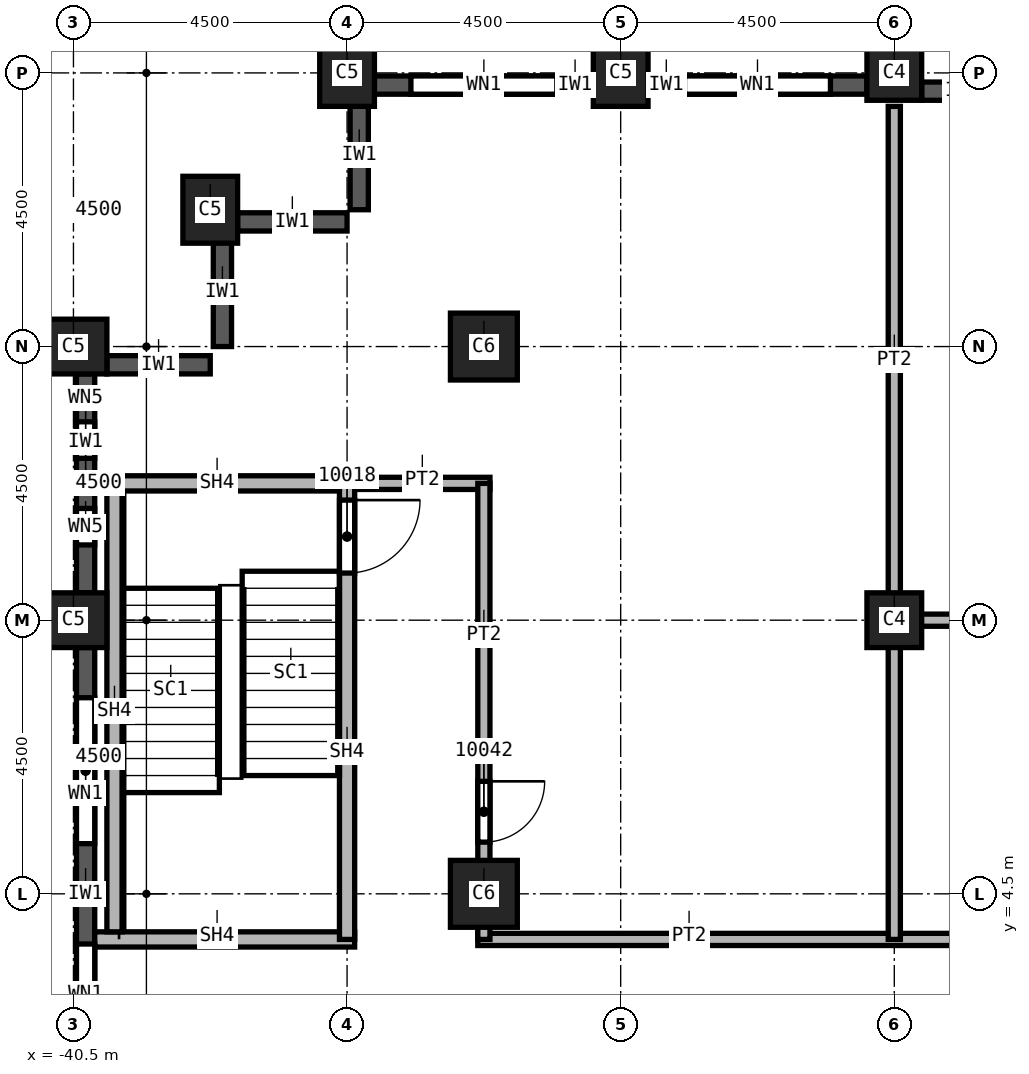
"""IFC4 building model, lengths in metres.
Left out: names, types, materials, properties, quantities, classifications, styles, units other than length and angle.
Written with IfcOpenShell. Run it as: python <this file> out.ifc"""

import sys

from ifc_helpers import new_model, si_unit, direction, frame, frame_2d, origin, origin_2d, place, context, subcontext, project, spatial, rectangle, extrude, element, fill, save


model = new_model("IFC4")
c1 = context("Model", 3, precision=1e-05, world=origin(), true_north=direction((0.0, 1.0)))
c2 = subcontext(c1, "Body", "Model", "MODEL_VIEW")
j1 = project(units=[si_unit("LENGTHUNIT", "METRE"), si_unit("PLANEANGLEUNIT", "RADIAN")], contexts=[c1])
p1 = place(None, origin())
s1 = spatial("IfcSite", under=j1, at=p1, CompositionType="ELEMENT")
p2 = place(p1, origin())
s2 = spatial("IfcBuilding", under=s1, at=p2, CompositionType="ELEMENT")
p3 = place(p2, frame((0.0, 0.0, 174.0)))
s3 = spatial("IfcBuildingStorey", under=s2, at=p3, CompositionType="ELEMENT", Elevation=174.0)
for number, where, z_axis, x_axis in (
    (1, (-40.5, 9.0, 0.0), (0.0, 0.0, 1.0), (0.0, 1.0, 0.0)),
    (2, (-40.5, 13.5, 0.0), (0.0, 0.0, 1.0), (0.0, 1.0, 0.0)),
    (3, (-38.25, 15.75, 0.0), (0.0, 0.0, 1.0), (1.0, 0.0, 0.0)),
    (4, (-31.5, 18.0, 0.0), (0.0, 0.0, 1.0), (1.0, 0.0, 0.0)),
    (5, (-36.0, 18.0, 0.0), (0.0, 0.0, 1.0), (1.0, 0.0, 0.0)),
):
    element("IfcColumn", number, at=place(p3, frame(where, z_axis=z_axis, x_axis=x_axis)), inside=s3, PredefinedType="COLUMN", context=c2, shape_type="SweptSolid", body=[
        extrude(rectangle(XDim=0.9, YDim=1.1, at=origin_2d()), origin(), (0.0, 0.0, 1.0), 3.59),
    ])
for number, where, z_axis, x_axis in (
    (6, (-33.75, 4.5, 0.0), (0.0, 0.0, 1.0), (1.0, 0.0, 0.0)),
    (7, (-33.75, 13.5, 0.0), (0.0, 0.0, 1.0), (1.0, 0.0, 0.0)),
):
    element("IfcColumn", number, at=place(p3, frame(where, z_axis=z_axis, x_axis=x_axis)), inside=s3, PredefinedType="COLUMN", context=c2, shape_type="SweptSolid", body=[
        extrude(rectangle(XDim=1.1, YDim=1.1, at=origin_2d()), origin(), (0.0, 0.0, 1.0), 3.59),
    ])
for number, where, z_axis, x_axis in (
    (8, (-27.0, 9.0, 0.0), (0.0, 0.0, 1.0), (1.0, 0.0, 0.0)),
    (9, (-27.0, 18.0, 0.0), (0.0, 0.0, 1.0), (1.0, 0.0, 0.0)),
):
    element("IfcColumn", number, at=place(p3, frame(where, z_axis=z_axis, x_axis=x_axis)), inside=s3, PredefinedType="COLUMN", context=c2, shape_type="SweptSolid", body=[
        extrude(rectangle(XDim=0.9, YDim=0.9, at=origin_2d()), origin(), (0.0, 0.0, 1.0), 3.59),
    ])
for number, where, z_axis, x_axis in (
    (10, (-35.8, 17.55, 0.0), (0.0, 0.0, 1.0), (0.0, -1.0, 0.0)),
    (11, (-37.8, 15.55, 0.0), (0.0, 0.0, 1.0), (1.0, 0.0, 0.0)),
    (12, (-38.05, 15.3, 0.0), (0.0, 0.0, 1.0), (0.0, -1.0, 0.0)),
):
    element("IfcWall", number, at=place(p3, frame(where, z_axis=z_axis, x_axis=x_axis)), inside=s3, PredefinedType="SOLIDWALL", context=c2, shape_type="SweptSolid", body=[
        extrude(rectangle(XDim=1.8, YDim=0.3, at=frame_2d((0.9, 0.0))), origin(), (0.0, 0.0, 1.0), 2.99),
    ])
p4 = place(p3, frame((-39.95, 13.2, 0.0), z_axis=(0.0, 0.0, 1.0), x_axis=(1.0, 0.0, 0.0)))
e13 = element("IfcWall", 13, at=p4, inside=s3, PredefinedType="SOLIDWALL", context=c2, shape_type="SweptSolid", body=[
    extrude(rectangle(XDim=1.7, YDim=0.3, at=frame_2d((0.85, 0.0))), origin(), (0.0, 0.0, 1.0), 2.99),
])
p5 = place(p3, frame((-25.2, 17.7, 0.0), z_axis=(0.0, 0.0, 1.0), x_axis=(-1.0, 0.0, 0.0)))
e14 = element("IfcWall", 14, at=p5, inside=s3, PredefinedType="SOLIDWALL", context=c2, shape_type="SweptSolid", body=[
    extrude(rectangle(XDim=1.35, YDim=0.3, at=frame_2d((0.675, 0.0))), origin(), (0.0, 0.0, 1.0), 2.99),
])
p6 = place(p3, frame((-27.45, 17.8, 0.0), z_axis=(0.0, 0.0, 1.0), x_axis=(-1.0, 0.0, 0.0)))
e15 = element("IfcWall", 15, at=p6, inside=s3, PredefinedType="SOLIDWALL", context=c2, shape_type="SweptSolid", body=[
    extrude(rectangle(XDim=3.6, YDim=0.3, at=frame_2d((1.8, 0.0))), origin(), (0.0, 0.0, 1.0), 2.99),
])
p7 = place(p6, frame((0.6, 0.0, 0.8)))
e16 = element("IfcOpeningElement", 16, at=p7, cuts=e15, PredefinedType="OPENING", context=c2, shape_type="SweptSolid", body=[
    extrude(rectangle(XDim=2.4, YDim=1.95, at=frame_2d((1.2, 0.975))), frame((0.0, 0.15, 0.0), z_axis=(0.0, -1.0, 0.0), x_axis=(1.0, 0.0, 0.0)), (0.0, 0.0, 1.0), 0.3),
])
p8 = place(p3, frame((-31.95, 17.8, 0.0), z_axis=(0.0, 0.0, 1.0), x_axis=(-1.0, 0.0, 0.0)))
e17 = element("IfcWall", 17, at=p8, inside=s3, PredefinedType="SOLIDWALL", context=c2, shape_type="SweptSolid", body=[
    extrude(rectangle(XDim=3.6, YDim=0.3, at=frame_2d((1.8, 0.0))), origin(), (0.0, 0.0, 1.0), 2.99),
])
p9 = place(p8, frame((0.6, 0.0, 0.8)))
e18 = element("IfcOpeningElement", 18, at=p9, cuts=e17, PredefinedType="OPENING", context=c2, shape_type="SweptSolid", body=[
    extrude(rectangle(XDim=2.4, YDim=1.95, at=frame_2d((1.2, 0.975))), frame((0.0, 0.15, 0.0), z_axis=(0.0, -1.0, 0.0), x_axis=(1.0, 0.0, 0.0)), (0.0, 0.0, 1.0), 0.3),
])
p10 = place(p3, frame((-40.3, 13.05, 0.0), z_axis=(0.0, 0.0, 1.0), x_axis=(0.0, -1.0, 0.0)))
e19 = element("IfcWall", 19, at=p10, inside=s3, PredefinedType="SOLIDWALL", context=c2, shape_type="SweptSolid", body=[
    extrude(rectangle(XDim=3.6, YDim=0.3, at=frame_2d((1.8, 0.0))), origin(), (0.0, 0.0, 1.0), 2.99),
])
p11 = place(p10, frame((0.788, 0.0, 0.8)))
e20 = element("IfcOpeningElement", 20, at=p11, cuts=e19, PredefinedType="OPENING", context=c2, shape_type="SweptSolid", body=[
    extrude(rectangle(XDim=0.6, YDim=1.95, at=frame_2d((0.3, 0.975))), frame((0.0, 0.15, 0.0), z_axis=(0.0, -1.0, 0.0), x_axis=(1.0, 0.0, 0.0)), (0.0, 0.0, 1.0), 0.3),
])
p12 = place(p10, frame((2.212, 0.0, 0.8)))
e21 = element("IfcOpeningElement", 21, at=p12, cuts=e19, PredefinedType="OPENING", context=c2, shape_type="SweptSolid", body=[
    extrude(rectangle(XDim=0.6, YDim=1.95, at=frame_2d((0.3, 0.975))), frame((0.0, 0.15, 0.0), z_axis=(0.0, -1.0, 0.0), x_axis=(1.0, 0.0, 0.0)), (0.0, 0.0, 1.0), 0.3),
])
p13 = place(p3, frame((-40.3, 8.55, 0.0), z_axis=(0.0, 0.0, 1.0), x_axis=(0.0, -1.0, 0.0)))
e22 = element("IfcWall", 22, at=p13, inside=s3, PredefinedType="SOLIDWALL", context=c2, shape_type="SweptSolid", body=[
    extrude(rectangle(XDim=8.1, YDim=0.3, at=frame_2d((4.05, 0.0))), origin(), (0.0, 0.0, 1.0), 2.99),
])
p14 = place(p13, frame((0.825, 0.0, 0.8)))
e23 = element("IfcOpeningElement", 23, at=p14, cuts=e22, PredefinedType="OPENING", context=c2, shape_type="SweptSolid", body=[
    extrude(rectangle(XDim=2.4, YDim=1.95, at=frame_2d((1.2, 0.975))), frame((0.0, 0.15, 0.0), z_axis=(0.0, -1.0, 0.0), x_axis=(1.0, 0.0, 0.0)), (0.0, 0.0, 1.0), 0.3),
])
p15 = place(p13, frame((4.875, 0.0, 0.8)))
e24 = element("IfcOpeningElement", 24, at=p15, cuts=e22, PredefinedType="OPENING", context=c2, shape_type="SweptSolid", body=[
    extrude(rectangle(XDim=2.4, YDim=1.95, at=frame_2d((1.2, 0.975))), frame((0.0, 0.15, 0.0), z_axis=(0.0, -1.0, 0.0), x_axis=(1.0, 0.0, 0.0)), (0.0, 0.0, 1.0), 0.3),
])
p16 = place(p3, frame((-36.0, 11.25, 0.0), z_axis=(0.0, 0.0, 1.0), x_axis=(1.0, 0.0, 0.0)))
e25 = element("IfcWall", 25, at=p16, inside=s3, PredefinedType="PARTITIONING", context=c2, shape_type="SweptSolid", body=[
    extrude(rectangle(XDim=2.35, YDim=0.2, at=frame_2d((1.175, 0.0))), origin(), (0.0, 0.0, 1.0), 3.59),
])
p17 = place(p3, frame((-33.85, 3.75, 0.0), z_axis=(0.0, 0.0, 1.0), x_axis=(1.0, 0.0, 0.0)))
e26 = element("IfcWall", 26, at=p17, inside=s3, PredefinedType="PARTITIONING", context=c2, shape_type="SweptSolid", body=[
    extrude(rectangle(XDim=18.45, YDim=0.2, at=frame_2d((9.225, 0.0))), origin(), (0.0, 0.0, 1.0), 3.59),
])
p18 = place(p3, frame((-33.75, 11.25, 0.0), z_axis=(0.0, 0.0, 1.0), x_axis=(0.0, -1.0, 0.0)))
e27 = element("IfcWall", 27, at=p18, inside=s3, PredefinedType="PARTITIONING", context=c2, shape_type="SweptSolid", body=[
    extrude(rectangle(XDim=7.5, YDim=0.2, at=frame_2d((3.75, 0.0))), origin(), (0.0, 0.0, 1.0), 3.59),
])
p19 = place(p18, frame((4.9, 0.0, 0.0)))
e28 = element("IfcOpeningElement", 28, at=p19, cuts=e27, PredefinedType="OPENING", context=c2, shape_type="SweptSolid", body=[
    extrude(rectangle(XDim=1.0, YDim=2.1, at=frame_2d((0.5, 1.05))), frame((0.0, 0.1, 0.0), z_axis=(0.0, -1.0, 0.0), x_axis=(1.0, 0.0, 0.0)), (0.0, 0.0, 1.0), 0.2),
])
p20 = place(p3, frame((-27.1, 9.0, 0.0), z_axis=(0.0, 0.0, 1.0), x_axis=(1.0, 0.0, 0.0)))
e29 = element("IfcWall", 29, at=p20, inside=s3, PredefinedType="PARTITIONING", context=c2, shape_type="SweptSolid", body=[
    extrude(rectangle(XDim=11.7, YDim=0.2, at=frame_2d((5.85, 0.0))), origin(), (0.0, 0.0, 1.0), 3.59),
])
p21 = place(p3, frame((-27.0, 3.75, 0.0), z_axis=(0.0, 0.0, 1.0), x_axis=(0.0, 1.0, 0.0)))
e30 = element("IfcWall", 30, at=p21, inside=s3, PredefinedType="PARTITIONING", context=c2, shape_type="SweptSolid", body=[
    extrude(rectangle(XDim=13.7, YDim=0.2, at=frame_2d((6.85, 0.0))), origin(), (0.0, 0.0, 1.0), 3.59),
])
p22 = place(p3, frame((-40.15, 3.75, 0.0), z_axis=(0.0, 0.0, 1.0), x_axis=(1.0, 0.0, 0.0)))
e31 = element("IfcWall", 31, at=p22, inside=s3, PredefinedType="SOLIDWALL", context=c2, shape_type="SweptSolid", body=[
    extrude(rectangle(XDim=4.275, YDim=0.25, at=frame_2d((2.137, 0.0))), origin(), (0.0, 0.0, 1.0), 3.59),
])
p23 = place(p3, frame((-40.15, 11.25, 0.0), z_axis=(0.0, 0.0, 1.0), x_axis=(1.0, 0.0, 0.0)))
e32 = element("IfcWall", 32, at=p23, inside=s3, PredefinedType="SOLIDWALL", context=c2, shape_type="SweptSolid", body=[
    extrude(rectangle(XDim=4.15, YDim=0.25, at=frame_2d((2.075, 0.0))), origin(), (0.0, 0.0, 1.0), 3.59),
])
p24 = place(p3, frame((-36.0, 11.375, 0.0), z_axis=(0.0, 0.0, 1.0), x_axis=(0.0, -1.0, 0.0)))
e33 = element("IfcWall", 33, at=p24, inside=s3, PredefinedType="SOLIDWALL", context=c2, shape_type="SweptSolid", body=[
    extrude(rectangle(XDim=7.625, YDim=0.25, at=frame_2d((3.812, 0.0))), origin(), (0.0, 0.0, 1.0), 3.59),
])
p25 = place(p24, frame((0.4, 0.0, 0.0)))
e34 = element("IfcOpeningElement", 34, at=p25, cuts=e33, PredefinedType="OPENING", context=c2, shape_type="SweptSolid", body=[
    extrude(rectangle(XDim=1.2, YDim=2.1, at=frame_2d((0.6, 1.05))), frame((0.0, 0.125, 0.0), z_axis=(0.0, -1.0, 0.0), x_axis=(1.0, 0.0, 0.0)), (0.0, 0.0, 1.0), 0.25),
])
p26 = place(p3, frame((-39.825, 3.875, 0.0), z_axis=(0.0, 0.0, 1.0), x_axis=(0.0, 1.0, 0.0)))
e35 = element("IfcWall", 35, at=p26, inside=s3, PredefinedType="SOLIDWALL", context=c2, shape_type="SweptSolid", body=[
    extrude(rectangle(XDim=7.25, YDim=0.25, at=frame_2d((3.625, 0.0))), origin(), (0.0, 0.0, 1.0), 3.59),
])
p27 = place(p7, origin())
e36 = element("IfcWindow", 36, at=p27, inside=s3, PartitioningType="SINGLE_PANEL", PredefinedType="WINDOW", context=c2, shape_type="SweptSolid", body=[
    extrude(rectangle(XDim=2.4, YDim=1.95, at=frame_2d((1.2, 0.975))), frame((0.0, 0.03, 0.0), z_axis=(0.0, -1.0, 0.0), x_axis=(1.0, 0.0, 0.0)), (0.0, 0.0, 1.0), 0.06),
])
fill(e16, e36)
p28 = place(p9, origin())
e37 = element("IfcWindow", 37, at=p28, inside=s3, PartitioningType="SINGLE_PANEL", PredefinedType="WINDOW", context=c2, shape_type="SweptSolid", body=[
    extrude(rectangle(XDim=2.4, YDim=1.95, at=frame_2d((1.2, 0.975))), frame((0.0, 0.03, 0.0), z_axis=(0.0, -1.0, 0.0), x_axis=(1.0, 0.0, 0.0)), (0.0, 0.0, 1.0), 0.06),
])
fill(e18, e37)
p29 = place(p14, origin())
e38 = element("IfcWindow", 38, at=p29, inside=s3, PartitioningType="SINGLE_PANEL", PredefinedType="WINDOW", context=c2, shape_type="SweptSolid", body=[
    extrude(rectangle(XDim=2.4, YDim=1.95, at=frame_2d((1.2, 0.975))), frame((0.0, 0.03, 0.0), z_axis=(0.0, -1.0, 0.0), x_axis=(1.0, 0.0, 0.0)), (0.0, 0.0, 1.0), 0.06),
])
fill(e23, e38)
p30 = place(p15, origin())
e39 = element("IfcWindow", 39, at=p30, inside=s3, PartitioningType="SINGLE_PANEL", PredefinedType="WINDOW", context=c2, shape_type="SweptSolid", body=[
    extrude(rectangle(XDim=2.4, YDim=1.95, at=frame_2d((1.2, 0.975))), frame((0.0, 0.03, 0.0), z_axis=(0.0, -1.0, 0.0), x_axis=(1.0, 0.0, 0.0)), (0.0, 0.0, 1.0), 0.06),
])
fill(e24, e39)
p31 = place(p25, origin())
e40 = element("IfcDoor", 40, at=p31, inside=s3, OperationType="SINGLE_SWING_LEFT", PredefinedType="DOOR", context=c2, shape_type="SweptSolid", body=[
    extrude(rectangle(XDim=1.2, YDim=2.1, at=frame_2d((0.6, 1.05))), frame((0.0, 0.025, 0.0), z_axis=(0.0, -1.0, 0.0), x_axis=(1.0, 0.0, 0.0)), (0.0, 0.0, 1.0), 0.05),
])
fill(e34, e40)
p32 = place(p19, origin())
e41 = element("IfcDoor", 41, at=p32, inside=s3, OperationType="SINGLE_SWING_LEFT", PredefinedType="DOOR", context=c2, shape_type="SweptSolid", body=[
    extrude(rectangle(XDim=1.0, YDim=2.1, at=frame_2d((0.5, 1.05))), frame((0.0, 0.025, 0.0), z_axis=(0.0, -1.0, 0.0), x_axis=(1.0, 0.0, 0.0)), (0.0, 0.0, 1.0), 0.05),
])
fill(e28, e41)
p33 = place(p11, origin())
e42 = element("IfcWindow", 42, at=p33, inside=s3, PartitioningType="SINGLE_PANEL", PredefinedType="WINDOW", context=c2, shape_type="SweptSolid", body=[
    extrude(rectangle(XDim=0.6, YDim=1.95, at=frame_2d((0.3, 0.975))), frame((0.0, 0.03, 0.0), z_axis=(0.0, -1.0, 0.0), x_axis=(1.0, 0.0, 0.0)), (0.0, 0.0, 1.0), 0.06),
])
fill(e20, e42)
p34 = place(p12, origin())
e43 = element("IfcWindow", 43, at=p34, inside=s3, PartitioningType="SINGLE_PANEL", PredefinedType="WINDOW", context=c2, shape_type="SweptSolid", body=[
    extrude(rectangle(XDim=0.6, YDim=1.95, at=frame_2d((0.3, 0.975))), frame((0.0, 0.03, 0.0), z_axis=(0.0, -1.0, 0.0), x_axis=(1.0, 0.0, 0.0)), (0.0, 0.0, 1.0), 0.06),
])
fill(e21, e43)
save(model, sys.argv[1])
